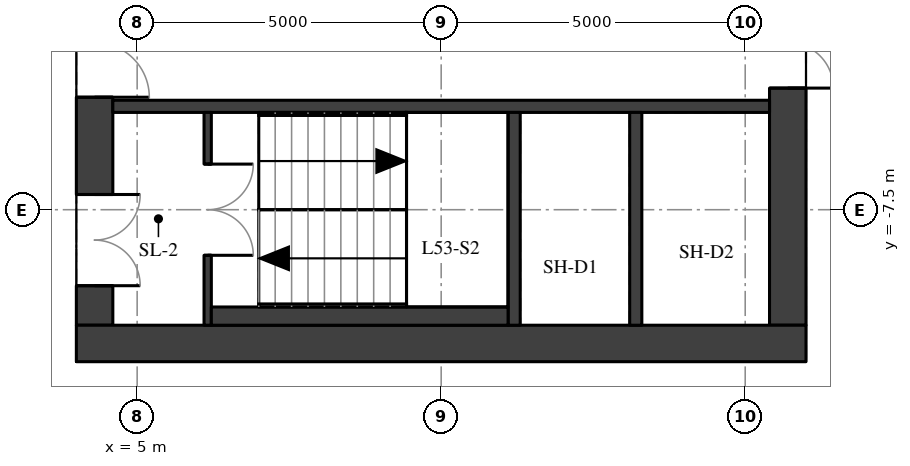
"""IFC4 building model, lengths in metres.
Left out: names, types, materials, properties, quantities, classifications, styles, units other than length and angle.
Written with IfcOpenShell. Run it as: python <this file> out.ifc"""

import sys

from ifc_helpers import new_model, si_unit, direction, frame, frame_2d, origin, place, context, subcontext, project, spatial, rectangle, extrude, element, fill, save


model = new_model("IFC4")
c1 = context("Model", 3, precision=1e-05, world=origin(), true_north=direction((0.0, 1.0)))
c2 = subcontext(c1, "Body", "Model", "MODEL_VIEW")
j1 = project(units=[si_unit("LENGTHUNIT", "METRE"), si_unit("PLANEANGLEUNIT", "RADIAN")], contexts=[c1])
p1 = place(None, origin())
s1 = spatial("IfcSite", under=j1, at=p1, CompositionType="ELEMENT")
p2 = place(p1, origin())
s2 = spatial("IfcBuilding", under=s1, at=p2, CompositionType="ELEMENT")
p3 = place(p2, frame((0.0, 0.0, 189.2)))
s3 = spatial("IfcBuildingStorey", under=s2, at=p3, CompositionType="ELEMENT", Elevation=189.2)
p4 = place(p3, frame((4.3, -9.4, 0.0), z_axis=(0.0, 0.0, 1.0), x_axis=(0.0, 1.0, 0.0)))
e1 = element("IfcWall", 1, at=p4, inside=s3, PredefinedType="SHEAR", context=c2, shape_type="SweptSolid", body=[
    extrude(rectangle(XDim=18.8, YDim=0.6, at=frame_2d((9.4, 0.0))), origin(), (0.0, 0.0, 1.0), 3.02),
])
p5 = place(p4, frame((0.65, 0.0, 0.0)))
e2 = element("IfcOpeningElement", 2, at=p5, cuts=e1, PredefinedType="OPENING", context=c2, shape_type="SweptSolid", body=[
    extrude(rectangle(XDim=1.5, YDim=2.1, at=frame_2d((0.75, 1.05))), frame((0.0, 0.31, 0.0), z_axis=(0.0, -1.0, 0.0), x_axis=(1.0, 0.0, 0.0)), (0.0, 0.0, 1.0), 0.62),
])
p6 = place(p4, frame((3.75, 0.0, 0.0)))
e3 = element("IfcOpeningElement", 3, at=p6, cuts=e1, PredefinedType="OPENING", context=c2, shape_type="SweptSolid", body=[
    extrude(rectangle(XDim=1.8, YDim=2.1, at=frame_2d((0.9, 1.05))), frame((0.0, 0.31, 0.0), z_axis=(0.0, -1.0, 0.0), x_axis=(1.0, 0.0, 0.0)), (0.0, 0.0, 1.0), 0.62),
])
p7 = place(p4, frame((6.25, 0.0, 0.0)))
e4 = element("IfcOpeningElement", 4, at=p7, cuts=e1, PredefinedType="OPENING", context=c2, shape_type="SweptSolid", body=[
    extrude(rectangle(XDim=1.1, YDim=2.1, at=frame_2d((0.55, 1.05))), frame((0.0, 0.31, 0.0), z_axis=(0.0, -1.0, 0.0), x_axis=(1.0, 0.0, 0.0)), (0.0, 0.0, 1.0), 0.62),
])
p8 = place(p4, frame((8.9, 0.0, 0.0)))
e5 = element("IfcOpeningElement", 5, at=p8, cuts=e1, PredefinedType="OPENING", context=c2, shape_type="SweptSolid", body=[
    extrude(rectangle(XDim=1.0, YDim=2.1, at=frame_2d((0.5, 1.05))), frame((0.0, 0.31, 0.0), z_axis=(0.0, -1.0, 0.0), x_axis=(1.0, 0.0, 0.0)), (0.0, 0.0, 1.0), 0.62),
])
p9 = place(p4, frame((11.45, 0.0, 0.0)))
e6 = element("IfcOpeningElement", 6, at=p9, cuts=e1, PredefinedType="OPENING", context=c2, shape_type="SweptSolid", body=[
    extrude(rectangle(XDim=1.1, YDim=2.1, at=frame_2d((0.55, 1.05))), frame((0.0, 0.31, 0.0), z_axis=(0.0, -1.0, 0.0), x_axis=(1.0, 0.0, 0.0)), (0.0, 0.0, 1.0), 0.62),
])
p10 = place(p4, frame((13.25, 0.0, 0.0)))
e7 = element("IfcOpeningElement", 7, at=p10, cuts=e1, PredefinedType="OPENING", context=c2, shape_type="SweptSolid", body=[
    extrude(rectangle(XDim=1.8, YDim=2.1, at=frame_2d((0.9, 1.05))), frame((0.0, 0.31, 0.0), z_axis=(0.0, -1.0, 0.0), x_axis=(1.0, 0.0, 0.0)), (0.0, 0.0, 1.0), 0.62),
])
p11 = place(p4, frame((16.65, 0.0, 0.0)))
e8 = element("IfcOpeningElement", 8, at=p11, cuts=e1, PredefinedType="OPENING", context=c2, shape_type="SweptSolid", body=[
    extrude(rectangle(XDim=1.5, YDim=2.1, at=frame_2d((0.75, 1.05))), frame((0.0, 0.31, 0.0), z_axis=(0.0, -1.0, 0.0), x_axis=(1.0, 0.0, 0.0)), (0.0, 0.0, 1.0), 0.62),
])
p12 = place(p3, frame((15.7, -9.4, 0.0), z_axis=(0.0, 0.0, 1.0), x_axis=(0.0, 1.0, 0.0)))
e9 = element("IfcWall", 9, at=p12, inside=s3, PredefinedType="SHEAR", context=c2, shape_type="SweptSolid", body=[
    extrude(rectangle(XDim=18.8, YDim=0.6, at=frame_2d((9.4, 0.0))), origin(), (0.0, 0.0, 1.0), 3.02),
])
p13 = place(p12, frame((13.4, 0.0, 0.0)))
e10 = element("IfcOpeningElement", 10, at=p13, cuts=e9, PredefinedType="OPENING", context=c2, shape_type="SweptSolid", body=[
    extrude(rectangle(XDim=1.5, YDim=2.1, at=frame_2d((0.75, 1.05))), frame((0.0, 0.31, 0.0), z_axis=(0.0, -1.0, 0.0), x_axis=(1.0, 0.0, 0.0)), (0.0, 0.0, 1.0), 0.62),
])
p14 = place(p12, frame((3.9, 0.0, 0.0)))
e11 = element("IfcOpeningElement", 11, at=p14, cuts=e9, PredefinedType="OPENING", context=c2, shape_type="SweptSolid", body=[
    extrude(rectangle(XDim=1.5, YDim=2.1, at=frame_2d((0.75, 1.05))), frame((0.0, 0.31, 0.0), z_axis=(0.0, -1.0, 0.0), x_axis=(1.0, 0.0, 0.0)), (0.0, 0.0, 1.0), 0.62),
])
p15 = place(p3, frame((4.0, -9.7, 0.0), z_axis=(0.0, 0.0, 1.0), x_axis=(1.0, 0.0, 0.0)))
e12 = element("IfcWall", 12, at=p15, inside=s3, PredefinedType="SHEAR", context=c2, shape_type="SweptSolid", body=[
    extrude(rectangle(XDim=12.0, YDim=0.6, at=frame_2d((6.0, 0.0))), origin(), (0.0, 0.0, 1.0), 3.02),
])
p16 = place(p3, frame((4.6, -5.8, 0.0), z_axis=(0.0, 0.0, 1.0), x_axis=(1.0, 0.0, 0.0)))
e13 = element("IfcWall", 13, at=p16, inside=s3, PredefinedType="SHEAR", context=c2, shape_type="SweptSolid", body=[
    extrude(rectangle(XDim=10.8, YDim=0.2, at=frame_2d((5.4, 0.0))), origin(), (0.0, 0.0, 1.0), 3.02),
])
for number, where, z_axis, x_axis in (
    (14, (11.2, -9.4, 0.0), (0.0, 0.0, 1.0), (0.0, 1.0, 0.0)),
    (15, (13.2, -9.4, 0.0), (0.0, 0.0, 1.0), (0.0, 1.0, 0.0)),
):
    element("IfcWall", number, at=place(p3, frame(where, z_axis=z_axis, x_axis=x_axis)), inside=s3, PredefinedType="SHEAR", context=c2, shape_type="SweptSolid", body=[
        extrude(rectangle(XDim=3.5, YDim=0.2, at=frame_2d((1.75, 0.0))), origin(), (0.0, 0.0, 1.0), 3.02),
    ])
p17 = place(p3, frame((6.16, -9.4, 0.0), z_axis=(0.0, 0.0, 1.0), x_axis=(0.0, 1.0, 0.0)))
e16 = element("IfcWall", 16, at=p17, inside=s3, PredefinedType="SHEAR", context=c2, shape_type="SweptSolid", body=[
    extrude(rectangle(XDim=3.5, YDim=0.12, at=frame_2d((1.75, 0.0))), origin(), (0.0, 0.0, 1.0), 3.02),
])
p18 = place(p17, frame((1.15, 0.0, 0.0)))
e17 = element("IfcOpeningElement", 17, at=p18, cuts=e16, PredefinedType="OPENING", context=c2, shape_type="SweptSolid", body=[
    extrude(rectangle(XDim=1.5, YDim=2.1, at=frame_2d((0.75, 1.05))), frame((0.0, 0.07, 0.0), z_axis=(0.0, -1.0, 0.0), x_axis=(1.0, 0.0, 0.0)), (0.0, 0.0, 1.0), 0.14),
])
p19 = place(p3, frame((6.22, -9.25, 0.0), z_axis=(0.0, 0.0, 1.0), x_axis=(1.0, 0.0, 0.0)))
e18 = element("IfcWall", 18, at=p19, inside=s3, PredefinedType="PARTITIONING", context=c2, shape_type="SweptSolid", body=[
    extrude(rectangle(XDim=4.88, YDim=0.3, at=frame_2d((2.44, 0.0))), origin(), (0.0, 0.0, 1.0), 3.02),
])
p20 = place(p5, origin())
e19 = element("IfcDoor", 19, at=p20, inside=s3, OperationType="DOUBLE_DOOR_SINGLE_SWING", PredefinedType="DOOR", context=c2, shape_type="SweptSolid", body=[
    extrude(rectangle(XDim=1.5, YDim=2.1, at=frame_2d((0.75, 1.05))), frame((0.0, 0.025, 0.0), z_axis=(0.0, -1.0, 0.0), x_axis=(1.0, 0.0, 0.0)), (0.0, 0.0, 1.0), 0.05),
])
fill(e2, e19)
p21 = place(p6, origin())
e20 = element("IfcDoor", 20, at=p21, inside=s3, OperationType="DOUBLE_DOOR_SINGLE_SWING", PredefinedType="DOOR", context=c2, shape_type="SweptSolid", body=[
    extrude(rectangle(XDim=1.8, YDim=2.1, at=frame_2d((0.9, 1.05))), frame((0.0, 0.025, 0.0), z_axis=(0.0, -1.0, 0.0), x_axis=(1.0, 0.0, 0.0)), (0.0, 0.0, 1.0), 0.05),
])
fill(e3, e20)
p22 = place(p14, origin())
e21 = element("IfcDoor", 21, at=p22, inside=s3, OperationType="DOUBLE_DOOR_SINGLE_SWING", PredefinedType="DOOR", context=c2, shape_type="SweptSolid", body=[
    extrude(rectangle(XDim=1.5, YDim=2.1, at=frame_2d((0.75, 1.05))), frame((0.0, 0.025, 0.0), z_axis=(0.0, -1.0, 0.0), x_axis=(1.0, 0.0, 0.0)), (0.0, 0.0, 1.0), 0.05),
])
fill(e11, e21)
p23 = place(p18, origin())
e22 = element("IfcDoor", 22, at=p23, inside=s3, OperationType="DOUBLE_DOOR_SINGLE_SWING", PredefinedType="DOOR", context=c2, shape_type="SweptSolid", body=[
    extrude(rectangle(XDim=1.5, YDim=2.1, at=frame_2d((0.75, 1.05))), frame((0.0, 0.025, 0.0), z_axis=(0.0, -1.0, 0.0), x_axis=(1.0, 0.0, 0.0)), (0.0, 0.0, 1.0), 0.05),
])
fill(e17, e22)
save(model, sys.argv[1])
